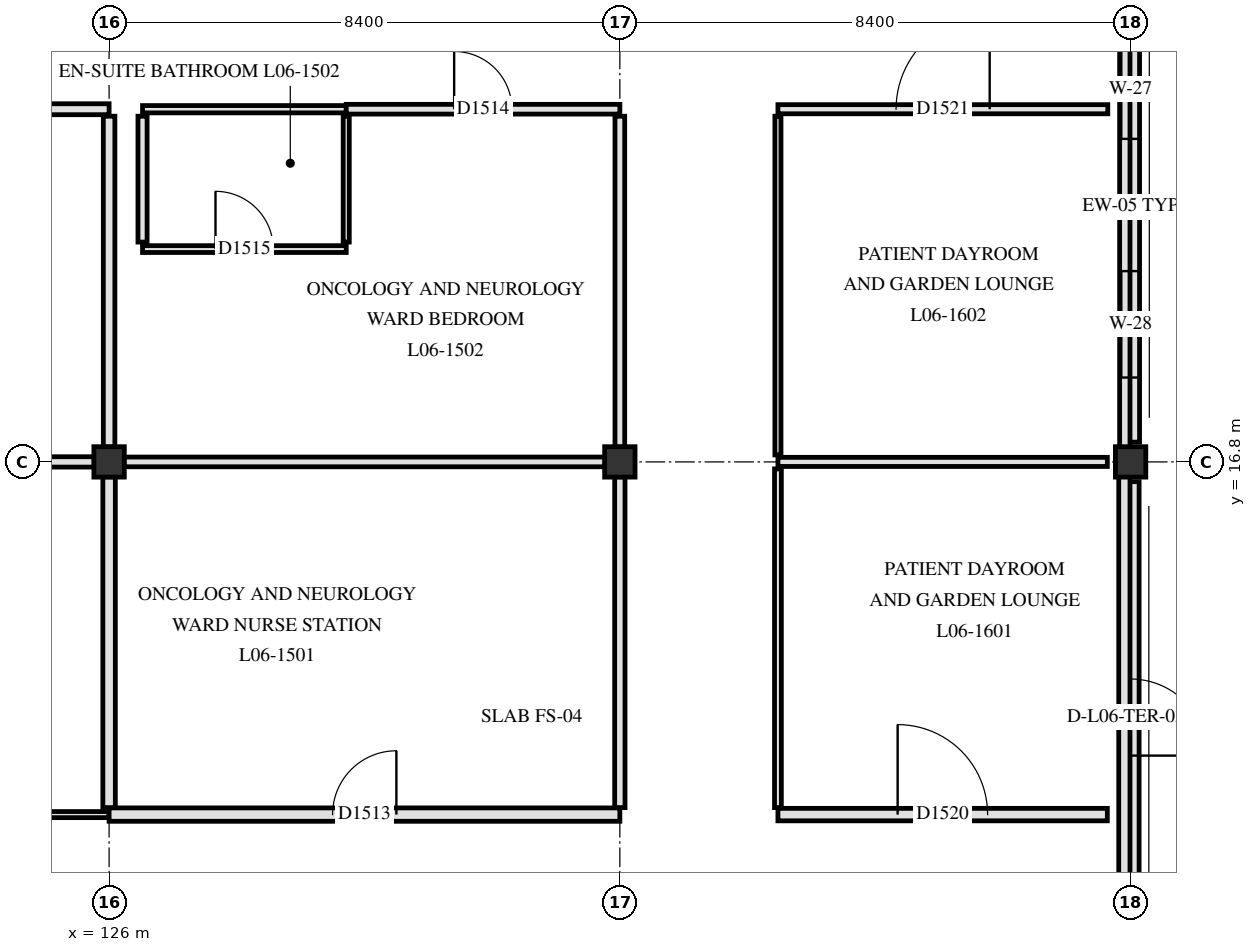
"""IFC4 building model, lengths in metres.
Left out: names, types, materials, properties, quantities, classifications, styles, units other than length and angle.
Written with IfcOpenShell. Run it as: python <this file> out.ifc"""

import sys

from ifc_helpers import new_model, si_unit, direction, frame, frame_2d, origin, origin_2d, place, context, subcontext, project, spatial, rectangle, extrude, element, fill, save


model = new_model("IFC4")
c1 = context("Model", 3, precision=1e-05, world=origin(), true_north=direction((0.0, 1.0)))
c2 = subcontext(c1, "Body", "Model", "MODEL_VIEW")
j1 = project(units=[si_unit("LENGTHUNIT", "METRE"), si_unit("PLANEANGLEUNIT", "RADIAN")], contexts=[c1])
p1 = place(None, origin())
s1 = spatial("IfcSite", under=j1, at=p1, CompositionType="ELEMENT")
p2 = place(p1, origin())
s2 = spatial("IfcBuilding", under=s1, at=p2, CompositionType="ELEMENT")
p3 = place(p2, frame((0.0, 0.0, 26.4)))
s3 = spatial("IfcBuildingStorey", under=s2, at=p3, CompositionType="ELEMENT", Elevation=26.4)
for number, where, z_axis, x_axis in (
    (1, (126.0, 16.8, 0.0), (0.0, 0.0, 1.0), (1.0, 0.0, 0.0)),
    (2, (134.4, 16.8, 0.0), (0.0, 0.0, 1.0), (1.0, 0.0, 0.0)),
    (3, (142.8, 16.8, 0.0), (0.0, 0.0, 1.0), (1.0, 0.0, 0.0)),
):
    element("IfcColumn", number, at=place(p3, frame(where, z_axis=z_axis, x_axis=x_axis)), inside=s3, PredefinedType="COLUMN", context=c2, shape_type="SweptSolid", body=[
        extrude(rectangle(XDim=0.5, YDim=0.5, at=origin_2d()), origin(), (0.0, 0.0, 1.0), 3.9),
    ])
p4 = place(p3, frame((142.8, 24.875, 0.0), z_axis=(0.0, 0.0, 1.0), x_axis=(0.0, -1.0, 0.0)))
e4 = element("IfcWall", 4, at=p4, inside=s3, PredefinedType="SOLIDWALL", context=c2, shape_type="SweptSolid", body=[
    extrude(rectangle(XDim=7.75, YDim=0.295, at=frame_2d((3.875, 0.0))), origin(), (0.0, 0.0, 1.0), 3.34),
])
p5 = place(p4, frame((1.113, 0.0, 0.85)))
e5 = element("IfcOpeningElement", 5, at=p5, cuts=e4, PredefinedType="OPENING", context=c2, shape_type="SweptSolid", body=[
    extrude(rectangle(XDim=1.65, YDim=1.54, at=frame_2d((0.825, 0.77))), frame((0.0, 0.157, 0.0), z_axis=(0.0, -1.0, 0.0), x_axis=(1.0, 0.0, 0.0)), (0.0, 0.0, 1.0), 0.315),
])
p6 = place(p4, frame((4.938, 0.0, 0.85)))
e6 = element("IfcOpeningElement", 6, at=p6, cuts=e4, PredefinedType="OPENING", context=c2, shape_type="SweptSolid", body=[
    extrude(rectangle(XDim=1.75, YDim=1.54, at=frame_2d((0.875, 0.77))), frame((0.0, 0.157, 0.0), z_axis=(0.0, -1.0, 0.0), x_axis=(1.0, 0.0, 0.0)), (0.0, 0.0, 1.0), 0.315),
])
p7 = place(p3, frame((142.8, 16.475, 0.0), z_axis=(0.0, 0.0, 1.0), x_axis=(0.0, -1.0, 0.0)))
e7 = element("IfcWall", 7, at=p7, inside=s3, PredefinedType="SOLIDWALL", context=c2, shape_type="SweptSolid", body=[
    extrude(rectangle(XDim=7.75, YDim=0.28, at=frame_2d((3.875, 0.0))), origin(), (0.0, 0.0, 1.0), 3.34),
])
p8 = place(p7, frame((3.245, 0.0, 0.0)))
e8 = element("IfcOpeningElement", 8, at=p8, cuts=e7, PredefinedType="OPENING", context=c2, shape_type="SweptSolid", body=[
    extrude(rectangle(XDim=1.26, YDim=2.15, at=frame_2d((0.63, 1.075))), frame((0.0, 0.15, 0.0), z_axis=(0.0, -1.0, 0.0), x_axis=(1.0, 0.0, 0.0)), (0.0, 0.0, 1.0), 0.3),
])
p9 = place(p3, frame((142.698, 16.8, 3.88), z_axis=(0.0, 0.0, 1.0), x_axis=(0.0, -1.0, 0.0)))
e9 = element("IfcWall", 9, at=p9, inside=s3, PredefinedType="PARAPET", context=c2, shape_type="SweptSolid", body=[
    extrude(rectangle(XDim=8.4, YDim=0.185, at=frame_2d((4.2, 0.0))), origin(), (0.0, 0.0, 1.0), 1.17),
])
p10 = place(p3, frame((142.705, 25.2, 3.88), z_axis=(0.0, 0.0, 1.0), x_axis=(0.0, -1.0, 0.0)))
e10 = element("IfcWall", 10, at=p10, inside=s3, PredefinedType="PARAPET", context=c2, shape_type="SweptSolid", body=[
    extrude(rectangle(XDim=8.4, YDim=0.17, at=frame_2d((4.2, 0.0))), origin(), (0.0, 0.0, 1.0), 1.17),
])
p11 = place(p3, frame((117.6, 11.0, 0.0), z_axis=(0.0, 0.0, 1.0), x_axis=(1.0, 0.0, 0.0)))
e11 = element("IfcWall", 11, at=p11, inside=s3, PredefinedType="PARTITIONING", context=c2, shape_type="SweptSolid", body=[
    extrude(rectangle(XDim=8.4, YDim=0.1, at=frame_2d((4.2, 0.0))), origin(), (0.0, 0.0, 1.0), 3.21),
])
p12 = place(p11, frame((3.525, 0.0, 0.0)))
e12 = element("IfcOpeningElement", 12, at=p12, cuts=e11, PredefinedType="OPENING", context=c2, shape_type="SweptSolid", body=[
    extrude(rectangle(XDim=1.35, YDim=2.2, at=frame_2d((0.675, 1.1))), frame((0.0, 0.06, 0.0), z_axis=(0.0, -1.0, 0.0), x_axis=(1.0, 0.0, 0.0)), (0.0, 0.0, 1.0), 0.12),
])
p13 = place(p3, frame((126.0, 11.0, 0.0), z_axis=(0.0, 0.0, 1.0), x_axis=(1.0, 0.0, 0.0)))
e13 = element("IfcWall", 13, at=p13, inside=s3, PredefinedType="PARTITIONING", context=c2, shape_type="SweptSolid", body=[
    extrude(rectangle(XDim=8.4, YDim=0.22, at=frame_2d((4.2, 0.0))), origin(), (0.0, 0.0, 1.0), 3.21),
])
p14 = place(p13, frame((3.675, 0.0, 0.0)))
e14 = element("IfcOpeningElement", 14, at=p14, cuts=e13, PredefinedType="OPENING", context=c2, shape_type="SweptSolid", body=[
    extrude(rectangle(XDim=1.05, YDim=2.15, at=frame_2d((0.525, 1.075))), frame((0.0, 0.12, 0.0), z_axis=(0.0, -1.0, 0.0), x_axis=(1.0, 0.0, 0.0)), (0.0, 0.0, 1.0), 0.24),
])
p15 = place(p3, frame((137.0, 11.0, 0.0), z_axis=(0.0, 0.0, 1.0), x_axis=(1.0, 0.0, 0.0)))
e15 = element("IfcWall", 15, at=p15, inside=s3, PredefinedType="PARTITIONING", context=c2, shape_type="SweptSolid", body=[
    extrude(rectangle(XDim=5.417, YDim=0.205, at=frame_2d((2.709, 0.0))), origin(), (0.0, 0.0, 1.0), 3.61),
])
p16 = place(p15, frame((1.969, 0.0, 0.0)))
e16 = element("IfcOpeningElement", 16, at=p16, cuts=e15, PredefinedType="OPENING", context=c2, shape_type="SweptSolid", body=[
    extrude(rectangle(XDim=1.48, YDim=2.22, at=frame_2d((0.74, 1.11))), frame((0.0, 0.113, 0.0), z_axis=(0.0, -1.0, 0.0), x_axis=(1.0, 0.0, 0.0)), (0.0, 0.0, 1.0), 0.225),
])
p17 = place(p3, frame((117.845, 16.8, 0.0), z_axis=(0.0, 0.0, 1.0), x_axis=(1.0, 0.0, 0.0)))
e17 = element("IfcWall", 17, at=p17, inside=s3, PredefinedType="PARTITIONING", context=c2, shape_type="SweptSolid", body=[
    extrude(rectangle(XDim=7.91, YDim=0.17, at=frame_2d((3.955, 0.0))), origin(), (0.0, 0.0, 1.0), 3.21),
])
p18 = place(p3, frame((126.245, 16.8, 0.0), z_axis=(0.0, 0.0, 1.0), x_axis=(1.0, 0.0, 0.0)))
e18 = element("IfcWall", 18, at=p18, inside=s3, PredefinedType="PARTITIONING", context=c2, shape_type="SweptSolid", body=[
    extrude(rectangle(XDim=7.91, YDim=0.16, at=frame_2d((3.955, 0.0))), origin(), (0.0, 0.0, 1.0), 3.21),
])
p19 = place(p3, frame((137.0, 16.8, 0.0), z_axis=(0.0, 0.0, 1.0), x_axis=(1.0, 0.0, 0.0)))
e19 = element("IfcWall", 19, at=p19, inside=s3, PredefinedType="PARTITIONING", context=c2, shape_type="SweptSolid", body=[
    extrude(rectangle(XDim=5.417, YDim=0.15, at=frame_2d((2.709, 0.0))), origin(), (0.0, 0.0, 1.0), 3.21),
])
p20 = place(p3, frame((126.55, 20.3, 0.0), z_axis=(0.0, 0.0, 1.0), x_axis=(1.0, 0.0, 0.0)))
e20 = element("IfcWall", 20, at=p20, inside=s3, PredefinedType="PARTITIONING", context=c2, shape_type="SweptSolid", body=[
    extrude(rectangle(XDim=3.35, YDim=0.112, at=frame_2d((1.675, 0.0))), origin(), (0.0, 0.0, 1.0), 3.61),
])
p21 = place(p20, frame((1.2, 0.0, 0.0)))
e21 = element("IfcOpeningElement", 21, at=p21, cuts=e20, PredefinedType="OPENING", context=c2, shape_type="SweptSolid", body=[
    extrude(rectangle(XDim=0.95, YDim=2.1, at=frame_2d((0.475, 1.05))), frame((0.0, 0.066, 0.0), z_axis=(0.0, -1.0, 0.0), x_axis=(1.0, 0.0, 0.0)), (0.0, 0.0, 1.0), 0.132),
])
p22 = place(p3, frame((121.5, 22.6, 0.0), z_axis=(0.0, 0.0, 1.0), x_axis=(1.0, 0.0, 0.0)))
e22 = element("IfcWall", 22, at=p22, inside=s3, PredefinedType="PARTITIONING", context=c2, shape_type="SweptSolid", body=[
    extrude(rectangle(XDim=4.5, YDim=0.18, at=frame_2d((2.25, 0.0))), origin(), (0.0, 0.0, 1.0), 3.21),
])
p23 = place(p22, frame((1.525, 0.0, 0.0)))
e23 = element("IfcOpeningElement", 23, at=p23, cuts=e22, PredefinedType="OPENING", context=c2, shape_type="SweptSolid", body=[
    extrude(rectangle(XDim=1.45, YDim=2.2, at=frame_2d((0.725, 1.1))), frame((0.0, 0.1, 0.0), z_axis=(0.0, -1.0, 0.0), x_axis=(1.0, 0.0, 0.0)), (0.0, 0.0, 1.0), 0.2),
])
p24 = place(p3, frame((126.55, 22.6, 0.0), z_axis=(0.0, 0.0, 1.0), x_axis=(1.0, 0.0, 0.0)))
e24 = element("IfcWall", 24, at=p24, inside=s3, PredefinedType="PARTITIONING", context=c2, shape_type="SweptSolid", body=[
    extrude(rectangle(XDim=3.35, YDim=0.12, at=frame_2d((1.675, 0.0))), origin(), (0.0, 0.0, 1.0), 3.61),
])
p25 = place(p3, frame((129.9, 22.6, 0.0), z_axis=(0.0, 0.0, 1.0), x_axis=(1.0, 0.0, 0.0)))
e25 = element("IfcWall", 25, at=p25, inside=s3, PredefinedType="PARTITIONING", context=c2, shape_type="SweptSolid", body=[
    extrude(rectangle(XDim=4.5, YDim=0.16, at=frame_2d((2.25, 0.0))), origin(), (0.0, 0.0, 1.0), 3.21),
])
p26 = place(p25, frame((1.775, 0.0, 0.0)))
e26 = element("IfcOpeningElement", 26, at=p26, cuts=e25, PredefinedType="OPENING", context=c2, shape_type="SweptSolid", body=[
    extrude(rectangle(XDim=0.95, YDim=2.1, at=frame_2d((0.475, 1.05))), frame((0.0, 0.09, 0.0), z_axis=(0.0, -1.0, 0.0), x_axis=(1.0, 0.0, 0.0)), (0.0, 0.0, 1.0), 0.18),
])
p27 = place(p3, frame((137.0, 22.6, 0.0), z_axis=(0.0, 0.0, 1.0), x_axis=(1.0, 0.0, 0.0)))
e27 = element("IfcWall", 27, at=p27, inside=s3, PredefinedType="PARTITIONING", context=c2, shape_type="SweptSolid", body=[
    extrude(rectangle(XDim=5.425, YDim=0.15, at=frame_2d((2.712, 0.0))), origin(), (0.0, 0.0, 1.0), 3.61),
])
p28 = place(p27, frame((1.942, 0.0, 0.0)))
e28 = element("IfcOpeningElement", 28, at=p28, cuts=e27, PredefinedType="OPENING", context=c2, shape_type="SweptSolid", body=[
    extrude(rectangle(XDim=1.54, YDim=2.24, at=frame_2d((0.77, 1.12))), frame((0.0, 0.085, 0.0), z_axis=(0.0, -1.0, 0.0), x_axis=(1.0, 0.0, 0.0)), (0.0, 0.0, 1.0), 0.17),
])
p29 = place(p3, frame((126.0, 11.115, 0.0), z_axis=(0.0, 0.0, 1.0), x_axis=(0.0, 1.0, 0.0)))
e29 = element("IfcWall", 29, at=p29, inside=s3, PredefinedType="PARTITIONING", context=c2, shape_type="SweptSolid", body=[
    extrude(rectangle(XDim=5.44, YDim=0.205, at=frame_2d((2.72, 0.0))), origin(), (0.0, 0.0, 1.0), 3.21),
])
p30 = place(p3, frame((126.0, 17.045, 0.0), z_axis=(0.0, 0.0, 1.0), x_axis=(0.0, 1.0, 0.0)))
e30 = element("IfcWall", 30, at=p30, inside=s3, PredefinedType="PARTITIONING", context=c2, shape_type="SweptSolid", body=[
    extrude(rectangle(XDim=5.44, YDim=0.19, at=frame_2d((2.72, 0.0))), origin(), (0.0, 0.0, 1.0), 3.21),
])
p31 = place(p3, frame((126.55, 20.415, 0.0), z_axis=(0.0, 0.0, 1.0), x_axis=(0.0, 1.0, 0.0)))
e31 = element("IfcWall", 31, at=p31, inside=s3, PredefinedType="PARTITIONING", context=c2, shape_type="SweptSolid", body=[
    extrude(rectangle(XDim=2.07, YDim=0.15, at=frame_2d((1.035, 0.0))), origin(), (0.0, 0.0, 1.0), 3.34),
])
p32 = place(p3, frame((129.9, 20.415, 0.0), z_axis=(0.0, 0.0, 1.0), x_axis=(0.0, 1.0, 0.0)))
e32 = element("IfcWall", 32, at=p32, inside=s3, PredefinedType="PARTITIONING", context=c2, shape_type="SweptSolid", body=[
    extrude(rectangle(XDim=2.07, YDim=0.1, at=frame_2d((1.035, 0.0))), origin(), (0.0, 0.0, 1.0), 3.34),
])
p33 = place(p3, frame((134.4, 11.115, 0.0), z_axis=(0.0, 0.0, 1.0), x_axis=(0.0, 1.0, 0.0)))
e33 = element("IfcWall", 33, at=p33, inside=s3, PredefinedType="PARTITIONING", context=c2, shape_type="SweptSolid", body=[
    extrude(rectangle(XDim=5.44, YDim=0.17, at=frame_2d((2.72, 0.0))), origin(), (0.0, 0.0, 1.0), 3.21),
])
p34 = place(p3, frame((134.4, 17.045, 0.0), z_axis=(0.0, 0.0, 1.0), x_axis=(0.0, 1.0, 0.0)))
e34 = element("IfcWall", 34, at=p34, inside=s3, PredefinedType="PARTITIONING", context=c2, shape_type="SweptSolid", body=[
    extrude(rectangle(XDim=5.44, YDim=0.16, at=frame_2d((2.72, 0.0))), origin(), (0.0, 0.0, 1.0), 3.21),
])
p35 = place(p3, frame((137.0, 11.115, 0.0), z_axis=(0.0, 0.0, 1.0), x_axis=(0.0, 1.0, 0.0)))
e35 = element("IfcWall", 35, at=p35, inside=s3, PredefinedType="PARTITIONING", context=c2, shape_type="SweptSolid", body=[
    extrude(rectangle(XDim=5.57, YDim=0.112, at=frame_2d((2.785, 0.0))), origin(), (0.0, 0.0, 1.0), 3.34),
])
p36 = place(p3, frame((137.0, 16.915, 0.0), z_axis=(0.0, 0.0, 1.0), x_axis=(0.0, 1.0, 0.0)))
e36 = element("IfcWall", 36, at=p36, inside=s3, PredefinedType="PARTITIONING", context=c2, shape_type="SweptSolid", body=[
    extrude(rectangle(XDim=5.57, YDim=0.1, at=frame_2d((2.785, 0.0))), origin(), (0.0, 0.0, 1.0), 3.34),
])
p37 = place(p5, origin())
e37 = element("IfcWindow", 37, at=p37, inside=s3, PartitioningType="SINGLE_PANEL", PredefinedType="WINDOW", context=c2, shape_type="SweptSolid", body=[
    extrude(rectangle(XDim=1.65, YDim=1.54, at=frame_2d((0.825, 0.77))), frame((0.0, 0.03, 0.0), z_axis=(0.0, -1.0, 0.0), x_axis=(1.0, 0.0, 0.0)), (0.0, 0.0, 1.0), 0.06),
])
fill(e5, e37)
p38 = place(p6, origin())
e38 = element("IfcWindow", 38, at=p38, inside=s3, PartitioningType="SINGLE_PANEL", PredefinedType="WINDOW", context=c2, shape_type="SweptSolid", body=[
    extrude(rectangle(XDim=1.75, YDim=1.54, at=frame_2d((0.875, 0.77))), frame((0.0, 0.03, 0.0), z_axis=(0.0, -1.0, 0.0), x_axis=(1.0, 0.0, 0.0)), (0.0, 0.0, 1.0), 0.06),
])
fill(e6, e38)
p39 = place(p8, origin())
e39 = element("IfcDoor", 39, at=p39, inside=s3, OperationType="SINGLE_SWING_RIGHT", PredefinedType="DOOR", context=c2, shape_type="SweptSolid", body=[
    extrude(rectangle(XDim=1.26, YDim=2.15, at=frame_2d((0.63, 1.075))), frame((0.0, 0.025, 0.0), z_axis=(0.0, -1.0, 0.0), x_axis=(1.0, 0.0, 0.0)), (0.0, 0.0, 1.0), 0.05),
])
fill(e8, e39)
p40 = place(p14, origin())
e40 = element("IfcDoor", 40, at=p40, inside=s3, OperationType="SINGLE_SWING_RIGHT", PredefinedType="DOOR", context=c2, shape_type="SweptSolid", body=[
    extrude(rectangle(XDim=1.05, YDim=2.15, at=frame_2d((0.525, 1.075))), frame((0.0, 0.025, 0.0), z_axis=(0.0, -1.0, 0.0), x_axis=(1.0, 0.0, 0.0)), (0.0, 0.0, 1.0), 0.05),
])
fill(e14, e40)
p41 = place(p26, origin())
e41 = element("IfcDoor", 41, at=p41, inside=s3, OperationType="SINGLE_SWING_LEFT", PredefinedType="DOOR", context=c2, shape_type="SweptSolid", body=[
    extrude(rectangle(XDim=0.95, YDim=2.1, at=frame_2d((0.475, 1.05))), frame((0.0, 0.025, 0.0), z_axis=(0.0, -1.0, 0.0), x_axis=(1.0, 0.0, 0.0)), (0.0, 0.0, 1.0), 0.05),
])
fill(e26, e41)
p42 = place(p21, origin())
e42 = element("IfcDoor", 42, at=p42, inside=s3, OperationType="SINGLE_SWING_LEFT", PredefinedType="DOOR", context=c2, shape_type="SweptSolid", body=[
    extrude(rectangle(XDim=0.95, YDim=2.1, at=frame_2d((0.475, 1.05))), frame((0.0, 0.025, 0.0), z_axis=(0.0, -1.0, 0.0), x_axis=(1.0, 0.0, 0.0)), (0.0, 0.0, 1.0), 0.05),
])
fill(e21, e42)
p43 = place(p16, origin())
e43 = element("IfcDoor", 43, at=p43, inside=s3, OperationType="SINGLE_SWING_LEFT", PredefinedType="DOOR", context=c2, shape_type="SweptSolid", body=[
    extrude(rectangle(XDim=1.48, YDim=2.22, at=frame_2d((0.74, 1.11))), frame((0.0, 0.025, 0.0), z_axis=(0.0, -1.0, 0.0), x_axis=(1.0, 0.0, 0.0)), (0.0, 0.0, 1.0), 0.05),
])
fill(e16, e43)
p44 = place(p28, origin())
e44 = element("IfcDoor", 44, at=p44, inside=s3, OperationType="SINGLE_SWING_RIGHT", PredefinedType="DOOR", context=c2, shape_type="SweptSolid", body=[
    extrude(rectangle(XDim=1.54, YDim=2.24, at=frame_2d((0.77, 1.12))), frame((0.0, 0.025, 0.0), z_axis=(0.0, -1.0, 0.0), x_axis=(1.0, 0.0, 0.0)), (0.0, 0.0, 1.0), 0.05),
])
fill(e28, e44)
save(model, sys.argv[1])
